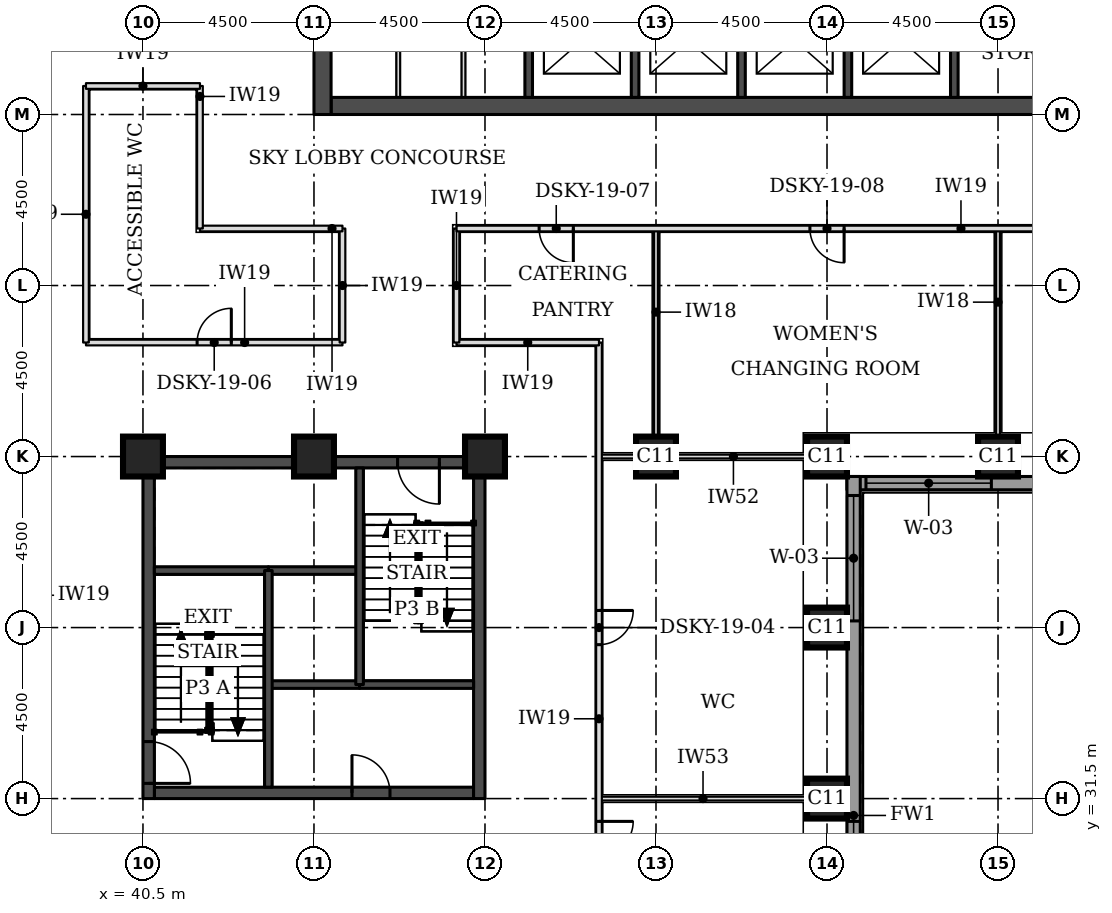
"""IFC4 building model, lengths in metres.
Left out: names, types, materials, properties, quantities, classifications, styles, units other than length and angle.
Written with IfcOpenShell. Run it as: python <this file> out.ifc"""

import sys

from ifc_helpers import new_model, si_unit, direction, frame, frame_2d, origin, origin_2d, place, context, subcontext, project, spatial, rectangle, extrude, element, fill, save


model = new_model("IFC4")
c1 = context("Model", 3, precision=1e-05, world=origin(), true_north=direction((0.0, 1.0)))
c2 = subcontext(c1, "Body", "Model", "MODEL_VIEW")
j1 = project(units=[si_unit("LENGTHUNIT", "METRE"), si_unit("PLANEANGLEUNIT", "RADIAN")], contexts=[c1])
p1 = place(None, origin())
s1 = spatial("IfcSite", under=j1, at=p1, CompositionType="ELEMENT")
p2 = place(p1, origin())
s2 = spatial("IfcBuilding", under=s1, at=p2, CompositionType="ELEMENT")
p3 = place(p2, frame((0.0, 0.0, 74.3)))
s3 = spatial("IfcBuildingStorey", under=s2, at=p3, CompositionType="ELEMENT", Elevation=74.3)
for number, where, z_axis, x_axis in (
    (1, (58.5, 31.5, 0.0), (0.0, 0.0, 1.0), (1.0, 0.0, 0.0)),
    (2, (58.5, 36.0, 0.0), (0.0, 0.0, 1.0), (1.0, 0.0, 0.0)),
    (3, (40.5, 40.5, 0.0), (0.0, 0.0, 1.0), (1.0, 0.0, 0.0)),
    (4, (45.0, 40.5, 0.0), (0.0, 0.0, 1.0), (1.0, 0.0, 0.0)),
    (5, (49.5, 40.5, 0.0), (0.0, 0.0, 1.0), (1.0, 0.0, 0.0)),
    (6, (54.0, 40.5, 0.0), (0.0, 0.0, 1.0), (1.0, 0.0, 0.0)),
    (7, (58.5, 40.5, 0.0), (0.0, 0.0, 1.0), (1.0, 0.0, 0.0)),
    (8, (63.0, 40.5, 0.0), (0.0, 0.0, 1.0), (1.0, 0.0, 0.0)),
):
    element("IfcColumn", number, at=place(p3, frame(where, z_axis=z_axis, x_axis=x_axis)), inside=s3, PredefinedType="COLUMN", context=c2, shape_type="SweptSolid", body=[
        extrude(rectangle(XDim=1.05, YDim=1.05, at=origin_2d()), origin(), (0.0, 0.0, 1.0), 4.6),
    ])
p4 = place(p3, frame((45.45, 49.725, 0.0), z_axis=(0.0, 0.0, 1.0), x_axis=(1.0, 0.0, 0.0)))
e9 = element("IfcWall", 9, at=p4, inside=s3, PredefinedType="SHEAR", context=c2, shape_type="SweptSolid", body=[
    extrude(rectangle(XDim=21.6, YDim=0.45, at=frame_2d((10.8, 0.0))), origin(), (0.0, 0.0, 1.0), 4.6),
])
p5 = place(p3, frame((45.225, 49.5, 0.0), z_axis=(0.0, 0.0, 1.0), x_axis=(0.0, 1.0, 0.0)))
e10 = element("IfcWall", 10, at=p5, inside=s3, PredefinedType="SHEAR", context=c2, shape_type="SweptSolid", body=[
    extrude(rectangle(XDim=22.5, YDim=0.45, at=frame_2d((11.25, 0.0))), origin(), (0.0, 0.0, 1.0), 4.6),
])
p6 = place(p5, frame((4.2, 0.0, 0.0)))
e11 = element("IfcOpeningElement", 11, at=p6, cuts=e10, PredefinedType="OPENING", context=c2, shape_type="SweptSolid", body=[
    extrude(rectangle(XDim=1.8, YDim=2.1, at=frame_2d((0.9, 1.05))), frame((0.0, 0.235, 0.0), z_axis=(0.0, -1.0, 0.0), x_axis=(1.0, 0.0, 0.0)), (0.0, 0.0, 1.0), 0.47),
])
p7 = place(p5, frame((6.9, 0.0, 0.0)))
e12 = element("IfcOpeningElement", 12, at=p7, cuts=e10, PredefinedType="OPENING", context=c2, shape_type="SweptSolid", body=[
    extrude(rectangle(XDim=1.1, YDim=2.1, at=frame_2d((0.55, 1.05))), frame((0.0, 0.235, 0.0), z_axis=(0.0, -1.0, 0.0), x_axis=(1.0, 0.0, 0.0)), (0.0, 0.0, 1.0), 0.47),
])
p8 = place(p5, frame((13.6, 0.0, 0.0)))
e13 = element("IfcOpeningElement", 13, at=p8, cuts=e10, PredefinedType="OPENING", context=c2, shape_type="SweptSolid", body=[
    extrude(rectangle(XDim=1.1, YDim=2.1, at=frame_2d((0.55, 1.05))), frame((0.0, 0.235, 0.0), z_axis=(0.0, -1.0, 0.0), x_axis=(1.0, 0.0, 0.0)), (0.0, 0.0, 1.0), 0.47),
])
p9 = place(p5, frame((16.5, 0.0, 0.0)))
e14 = element("IfcOpeningElement", 14, at=p9, cuts=e10, PredefinedType="OPENING", context=c2, shape_type="SweptSolid", body=[
    extrude(rectangle(XDim=1.8, YDim=2.1, at=frame_2d((0.9, 1.05))), frame((0.0, 0.235, 0.0), z_axis=(0.0, -1.0, 0.0), x_axis=(1.0, 0.0, 0.0)), (0.0, 0.0, 1.0), 0.47),
])
p10 = place(p3, frame((40.8, 31.65, 0.0), z_axis=(0.0, 0.0, 1.0), x_axis=(1.0, 0.0, 0.0)))
e15 = element("IfcWall", 15, at=p10, inside=s3, PredefinedType="SHEAR", context=c2, shape_type="SweptSolid", body=[
    extrude(rectangle(XDim=8.4, YDim=0.3, at=frame_2d((4.2, 0.0))), origin(), (0.0, 0.0, 1.0), 4.6),
])
p11 = place(p10, frame((5.2, 0.0, 0.0)))
e16 = element("IfcOpeningElement", 16, at=p11, cuts=e15, PredefinedType="OPENING", context=c2, shape_type="SweptSolid", body=[
    extrude(rectangle(XDim=1.0, YDim=2.1, at=frame_2d((0.5, 1.05))), frame((0.0, 0.16, 0.0), z_axis=(0.0, -1.0, 0.0), x_axis=(1.0, 0.0, 0.0)), (0.0, 0.0, 1.0), 0.32),
])
p12 = place(p3, frame((40.8, 40.35, 0.0), z_axis=(0.0, 0.0, 1.0), x_axis=(1.0, 0.0, 0.0)))
e17 = element("IfcWall", 17, at=p12, inside=s3, PredefinedType="SHEAR", context=c2, shape_type="SweptSolid", body=[
    extrude(rectangle(XDim=8.4, YDim=0.3, at=frame_2d((4.2, 0.0))), origin(), (0.0, 0.0, 1.0), 4.6),
])
p13 = place(p12, frame((6.4, 0.0, 0.0)))
e18 = element("IfcOpeningElement", 18, at=p13, cuts=e17, PredefinedType="OPENING", context=c2, shape_type="SweptSolid", body=[
    extrude(rectangle(XDim=1.1, YDim=2.1, at=frame_2d((0.55, 1.05))), frame((0.0, 0.16, 0.0), z_axis=(0.0, -1.0, 0.0), x_axis=(1.0, 0.0, 0.0)), (0.0, 0.0, 1.0), 0.32),
])
p14 = place(p3, frame((40.65, 31.5, 0.0), z_axis=(0.0, 0.0, 1.0), x_axis=(0.0, 1.0, 0.0)))
e19 = element("IfcWall", 19, at=p14, inside=s3, PredefinedType="SHEAR", context=c2, shape_type="SweptSolid", body=[
    extrude(rectangle(XDim=9.0, YDim=0.3, at=frame_2d((4.5, 0.0))), origin(), (0.0, 0.0, 1.0), 4.6),
])
p15 = place(p14, frame((0.4, 0.0, 0.0)))
e20 = element("IfcOpeningElement", 20, at=p15, cuts=e19, PredefinedType="OPENING", context=c2, shape_type="SweptSolid", body=[
    extrude(rectangle(XDim=1.1, YDim=2.1, at=frame_2d((0.55, 1.05))), frame((0.0, 0.16, 0.0), z_axis=(0.0, -1.0, 0.0), x_axis=(1.0, 0.0, 0.0)), (0.0, 0.0, 1.0), 0.32),
])
p16 = place(p3, frame((49.35, 31.5, 0.0), z_axis=(0.0, 0.0, 1.0), x_axis=(0.0, 1.0, 0.0)))
e21 = element("IfcWall", 21, at=p16, inside=s3, PredefinedType="SHEAR", context=c2, shape_type="SweptSolid", body=[
    extrude(rectangle(XDim=9.0, YDim=0.3, at=frame_2d((4.5, 0.0))), origin(), (0.0, 0.0, 1.0), 4.6),
])
p17 = place(p3, frame((59.025, 39.8, 0.0), z_axis=(0.0, 0.0, 1.0), x_axis=(1.0, 0.0, 0.0)))
e22 = element("IfcWall", 22, at=p17, inside=s3, PredefinedType="STANDARD", context=c2, shape_type="SweptSolid", body=[
    extrude(rectangle(XDim=13.337, YDim=0.35, at=frame_2d((6.669, 0.0))), origin(), (0.0, 0.0, 1.0), 4.425),
])
p18 = place(p17, frame((0.5, 0.0, 0.9)))
e23 = element("IfcOpeningElement", 23, at=p18, cuts=e22, PredefinedType="OPENING", context=c2, shape_type="SweptSolid", body=[
    extrude(rectangle(XDim=3.3, YDim=2.7, at=frame_2d((1.65, 1.35))), frame((0.0, 0.185, 0.0), z_axis=(0.0, -1.0, 0.0), x_axis=(1.0, 0.0, 0.0)), (0.0, 0.0, 1.0), 0.37),
])
p19 = place(p3, frame((59.2, 22.138, 0.0), z_axis=(0.0, 0.0, 1.0), x_axis=(0.0, 1.0, 0.0)))
e24 = element("IfcWall", 24, at=p19, inside=s3, PredefinedType="STANDARD", context=c2, shape_type="SweptSolid", body=[
    extrude(rectangle(XDim=17.837, YDim=0.35, at=frame_2d((8.919, 0.0))), origin(), (0.0, 0.0, 1.0), 4.425),
])
p20 = place(p19, frame((5.462, 0.0, 0.9)))
e25 = element("IfcOpeningElement", 25, at=p20, cuts=e24, PredefinedType="OPENING", context=c2, shape_type="SweptSolid", body=[
    extrude(rectangle(XDim=3.3, YDim=2.7, at=frame_2d((1.65, 1.35))), frame((0.0, 0.185, 0.0), z_axis=(0.0, -1.0, 0.0), x_axis=(1.0, 0.0, 0.0)), (0.0, 0.0, 1.0), 0.37),
])
p21 = place(p19, frame((14.037, 0.0, 0.9)))
e26 = element("IfcOpeningElement", 26, at=p21, cuts=e24, PredefinedType="OPENING", context=c2, shape_type="SweptSolid", body=[
    extrude(rectangle(XDim=3.3, YDim=2.7, at=frame_2d((1.65, 1.35))), frame((0.0, 0.185, 0.0), z_axis=(0.0, -1.0, 0.0), x_axis=(1.0, 0.0, 0.0)), (0.0, 0.0, 1.0), 0.37),
])
p22 = place(p3, frame((52.5, 31.5, 0.0), z_axis=(0.0, 0.0, 1.0), x_axis=(1.0, 0.0, 0.0)))
e27 = element("IfcWall", 27, at=p22, inside=s3, PredefinedType="PARTITIONING", context=c2, shape_type="SweptSolid", body=[
    extrude(rectangle(XDim=5.475, YDim=0.1, at=frame_2d((2.738, 0.0))), origin(), (0.0, 0.0, 1.0), 3.45),
])
p23 = place(p3, frame((52.5, 40.5, 0.0), z_axis=(0.0, 0.0, 1.0), x_axis=(1.0, 0.0, 0.0)))
e28 = element("IfcWall", 28, at=p23, inside=s3, PredefinedType="PARTITIONING", context=c2, shape_type="SweptSolid", body=[
    extrude(rectangle(XDim=5.475, YDim=0.1, at=frame_2d((2.738, 0.0))), origin(), (0.0, 0.0, 1.0), 3.7),
])
p24 = place(p3, frame((54.0, 40.5, 0.0), z_axis=(0.0, 0.0, 1.0), x_axis=(0.0, 1.0, 0.0)))
e29 = element("IfcWall", 29, at=p24, inside=s3, PredefinedType="PARTITIONING", context=c2, shape_type="SweptSolid", body=[
    extrude(rectangle(XDim=6.0, YDim=0.1, at=frame_2d((3.0, 0.0))), origin(), (0.0, 0.0, 1.0), 4.45),
])
p25 = place(p3, frame((63.0, 41.025, 0.0), z_axis=(0.0, 0.0, 1.0), x_axis=(0.0, 1.0, 0.0)))
e30 = element("IfcWall", 30, at=p25, inside=s3, PredefinedType="PARTITIONING", context=c2, shape_type="SweptSolid", body=[
    extrude(rectangle(XDim=5.475, YDim=0.1, at=frame_2d((2.738, 0.0))), origin(), (0.0, 0.0, 1.0), 4.45),
])
p26 = place(p3, frame((52.5, 28.5, 0.0), z_axis=(0.0, 0.0, 1.0), x_axis=(0.0, 1.0, 0.0)))
e31 = element("IfcWall", 31, at=p26, inside=s3, PredefinedType="PARTITIONING", context=c2, shape_type="SweptSolid", body=[
    extrude(rectangle(XDim=15.0, YDim=0.15, at=frame_2d((7.5, 0.0))), origin(), (0.0, 0.0, 1.0), 4.45),
])
p27 = place(p26, frame((0.6, 0.0, 0.0)))
e32 = element("IfcOpeningElement", 32, at=p27, cuts=e31, PredefinedType="OPENING", context=c2, shape_type="SweptSolid", body=[
    extrude(rectangle(XDim=1.8, YDim=2.4, at=frame_2d((0.9, 1.2))), frame((0.0, 0.085, 0.0), z_axis=(0.0, -1.0, 0.0), x_axis=(1.0, 0.0, 0.0)), (0.0, 0.0, 1.0), 0.17),
])
p28 = place(p26, frame((7.05, 0.0, 0.0)))
e33 = element("IfcOpeningElement", 33, at=p28, cuts=e31, PredefinedType="OPENING", context=c2, shape_type="SweptSolid", body=[
    extrude(rectangle(XDim=0.9, YDim=2.1, at=frame_2d((0.45, 1.05))), frame((0.0, 0.085, 0.0), z_axis=(0.0, -1.0, 0.0), x_axis=(1.0, 0.0, 0.0)), (0.0, 0.0, 1.0), 0.17),
])
p29 = place(p3, frame((39.0, 43.5, 0.0), z_axis=(0.0, 0.0, 1.0), x_axis=(1.0, 0.0, 0.0)))
e34 = element("IfcWall", 34, at=p29, inside=s3, PredefinedType="PARTITIONING", context=c2, shape_type="SweptSolid", body=[
    extrude(rectangle(XDim=6.75, YDim=0.15, at=frame_2d((3.375, 0.0))), origin(), (0.0, 0.0, 1.0), 4.45),
])
p30 = place(p29, frame((2.925, 0.0, 0.0)))
e35 = element("IfcOpeningElement", 35, at=p30, cuts=e34, PredefinedType="OPENING", context=c2, shape_type="SweptSolid", body=[
    extrude(rectangle(XDim=0.9, YDim=2.1, at=frame_2d((0.45, 1.05))), frame((0.0, 0.085, 0.0), z_axis=(0.0, -1.0, 0.0), x_axis=(1.0, 0.0, 0.0)), (0.0, 0.0, 1.0), 0.17),
])
p31 = place(p3, frame((39.0, 43.5, 0.0), z_axis=(0.0, 0.0, 1.0), x_axis=(0.0, 1.0, 0.0)))
e36 = element("IfcWall", 36, at=p31, inside=s3, PredefinedType="PARTITIONING", context=c2, shape_type="SweptSolid", body=[
    extrude(rectangle(XDim=6.75, YDim=0.15, at=frame_2d((3.375, 0.0))), origin(), (0.0, 0.0, 1.0), 4.45),
])
p32 = place(p3, frame((45.75, 43.5, 0.0), z_axis=(0.0, 0.0, 1.0), x_axis=(0.0, 1.0, 0.0)))
e37 = element("IfcWall", 37, at=p32, inside=s3, PredefinedType="PARTITIONING", context=c2, shape_type="SweptSolid", body=[
    extrude(rectangle(XDim=3.0, YDim=0.15, at=frame_2d((1.5, 0.0))), origin(), (0.0, 0.0, 1.0), 4.45),
])
p33 = place(p3, frame((48.75, 43.5, 0.0), z_axis=(0.0, 0.0, 1.0), x_axis=(1.0, 0.0, 0.0)))
e38 = element("IfcWall", 38, at=p33, inside=s3, PredefinedType="PARTITIONING", context=c2, shape_type="SweptSolid", body=[
    extrude(rectangle(XDim=3.75, YDim=0.15, at=frame_2d((1.875, 0.0))), origin(), (0.0, 0.0, 1.0), 4.45),
])
p34 = place(p3, frame((48.75, 43.5, 0.0), z_axis=(0.0, 0.0, 1.0), x_axis=(0.0, 1.0, 0.0)))
e39 = element("IfcWall", 39, at=p34, inside=s3, PredefinedType="PARTITIONING", context=c2, shape_type="SweptSolid", body=[
    extrude(rectangle(XDim=3.0, YDim=0.15, at=frame_2d((1.5, 0.0))), origin(), (0.0, 0.0, 1.0), 4.45),
])
for number, where, z_axis, x_axis in (
    (40, (42.0, 46.5, 0.0), (0.0, 0.0, 1.0), (1.0, 0.0, 0.0)),
    (41, (42.0, 46.5, 0.0), (0.0, 0.0, 1.0), (0.0, 1.0, 0.0)),
):
    element("IfcWall", number, at=place(p3, frame(where, z_axis=z_axis, x_axis=x_axis)), inside=s3, PredefinedType="PARTITIONING", context=c2, shape_type="SweptSolid", body=[
        extrude(rectangle(XDim=3.75, YDim=0.15, at=frame_2d((1.875, 0.0))), origin(), (0.0, 0.0, 1.0), 4.45),
    ])
p35 = place(p3, frame((48.75, 46.5, 0.0), z_axis=(0.0, 0.0, 1.0), x_axis=(1.0, 0.0, 0.0)))
e42 = element("IfcWall", 42, at=p35, inside=s3, PredefinedType="PARTITIONING", context=c2, shape_type="SweptSolid", body=[
    extrude(rectangle(XDim=21.75, YDim=0.15, at=frame_2d((10.875, 0.0))), origin(), (0.0, 0.0, 1.0), 4.45),
])
p36 = place(p35, frame((9.3, 0.0, 0.0)))
e43 = element("IfcOpeningElement", 43, at=p36, cuts=e42, PredefinedType="OPENING", context=c2, shape_type="SweptSolid", body=[
    extrude(rectangle(XDim=0.9, YDim=2.1, at=frame_2d((0.45, 1.05))), frame((0.0, 0.085, 0.0), z_axis=(0.0, -1.0, 0.0), x_axis=(1.0, 0.0, 0.0)), (0.0, 0.0, 1.0), 0.17),
])
p37 = place(p35, frame((2.175, 0.0, 0.0)))
e44 = element("IfcOpeningElement", 44, at=p37, cuts=e42, PredefinedType="OPENING", context=c2, shape_type="SweptSolid", body=[
    extrude(rectangle(XDim=0.9, YDim=2.1, at=frame_2d((0.45, 1.05))), frame((0.0, 0.085, 0.0), z_axis=(0.0, -1.0, 0.0), x_axis=(1.0, 0.0, 0.0)), (0.0, 0.0, 1.0), 0.17),
])
p38 = place(p35, frame((17.55, 0.0, 0.0)))
e45 = element("IfcOpeningElement", 45, at=p38, cuts=e42, PredefinedType="OPENING", context=c2, shape_type="SweptSolid", body=[
    extrude(rectangle(XDim=0.9, YDim=2.1, at=frame_2d((0.45, 1.05))), frame((0.0, 0.085, 0.0), z_axis=(0.0, -1.0, 0.0), x_axis=(1.0, 0.0, 0.0)), (0.0, 0.0, 1.0), 0.17),
])
p39 = place(p3, frame((39.0, 50.25, 0.0), z_axis=(0.0, 0.0, 1.0), x_axis=(1.0, 0.0, 0.0)))
e46 = element("IfcWall", 46, at=p39, inside=s3, PredefinedType="PARTITIONING", context=c2, shape_type="SweptSolid", body=[
    extrude(rectangle(XDim=3.0, YDim=0.15, at=frame_2d((1.5, 0.0))), origin(), (0.0, 0.0, 1.0), 4.45),
])
for number, where, z_axis, x_axis in (
    (47, (47.218, 49.95, 0.0), (0.0, 0.0, 1.0), (0.0, 1.0, 0.0)),
    (48, (48.934, 49.95, 0.0), (0.0, 0.0, 1.0), (0.0, 1.0, 0.0)),
):
    element("IfcWall", number, at=place(p3, frame(where, z_axis=z_axis, x_axis=x_axis)), inside=s3, PredefinedType="PARTITIONING", context=c2, shape_type="SweptSolid", body=[
        extrude(rectangle(XDim=3.05, YDim=0.1, at=frame_2d((1.525, 0.0))), origin(), (0.0, 0.0, 1.0), 4.45),
    ])
for number, where, z_axis, x_axis in (
    (49, (50.65, 49.95, 0.0), (0.0, 0.0, 1.0), (0.0, 1.0, 0.0)),
    (50, (53.45, 49.95, 0.0), (0.0, 0.0, 1.0), (0.0, 1.0, 0.0)),
    (51, (56.25, 49.95, 0.0), (0.0, 0.0, 1.0), (0.0, 1.0, 0.0)),
    (52, (59.05, 49.95, 0.0), (0.0, 0.0, 1.0), (0.0, 1.0, 0.0)),
    (53, (61.85, 49.95, 0.0), (0.0, 0.0, 1.0), (0.0, 1.0, 0.0)),
):
    element("IfcWall", number, at=place(p3, frame(where, z_axis=z_axis, x_axis=x_axis)), inside=s3, PredefinedType="SOLIDWALL", context=c2, shape_type="SweptSolid", body=[
        extrude(rectangle(XDim=3.05, YDim=0.2, at=frame_2d((1.525, 0.0))), origin(), (0.0, 0.0, 1.0), 4.45),
    ])
p40 = place(p3, frame((43.8, 34.5, 0.0), z_axis=(0.0, 0.0, 1.0), x_axis=(1.0, 0.0, 0.0)))
e54 = element("IfcWall", 54, at=p40, inside=s3, PredefinedType="SOLIDWALL", context=c2, shape_type="SweptSolid", body=[
    extrude(rectangle(XDim=2.4, YDim=0.2, at=frame_2d((1.2, 0.0))), origin(), (0.0, 0.0, 1.0), 4.45),
])
p41 = place(p3, frame((46.2, 34.5, 0.0), z_axis=(0.0, 0.0, 1.0), x_axis=(1.0, 0.0, 0.0)))
e55 = element("IfcWall", 55, at=p41, inside=s3, PredefinedType="SOLIDWALL", context=c2, shape_type="SweptSolid", body=[
    extrude(rectangle(XDim=3.0, YDim=0.2, at=frame_2d((1.5, 0.0))), origin(), (0.0, 0.0, 1.0), 4.45),
])
p42 = place(p3, frame((43.8, 37.5, 0.0), z_axis=(0.0, 0.0, 1.0), x_axis=(1.0, 0.0, 0.0)))
e56 = element("IfcWall", 56, at=p42, inside=s3, PredefinedType="SOLIDWALL", context=c2, shape_type="SweptSolid", body=[
    extrude(rectangle(XDim=2.4, YDim=0.2, at=frame_2d((1.2, 0.0))), origin(), (0.0, 0.0, 1.0), 4.6),
])
p43 = place(p3, frame((40.8, 37.5, 0.0), z_axis=(0.0, 0.0, 1.0), x_axis=(1.0, 0.0, 0.0)))
e57 = element("IfcWall", 57, at=p43, inside=s3, PredefinedType="SOLIDWALL", context=c2, shape_type="SweptSolid", body=[
    extrude(rectangle(XDim=3.0, YDim=0.2, at=frame_2d((1.5, 0.0))), origin(), (0.0, 0.0, 1.0), 4.45),
])
for number, where, z_axis, x_axis in (
    (58, (43.8, 31.8, 0.0), (0.0, 0.0, 1.0), (0.0, 1.0, 0.0)),
    (59, (46.2, 34.5, 0.0), (0.0, 0.0, 1.0), (0.0, 1.0, 0.0)),
):
    element("IfcWall", number, at=place(p3, frame(where, z_axis=z_axis, x_axis=x_axis)), inside=s3, PredefinedType="SOLIDWALL", context=c2, shape_type="SweptSolid", body=[
        extrude(rectangle(XDim=5.7, YDim=0.2, at=frame_2d((2.85, 0.0))), origin(), (0.0, 0.0, 1.0), 4.45),
    ])
p44 = place(p18, origin())
e60 = element("IfcWindow", 60, at=p44, inside=s3, PartitioningType="SINGLE_PANEL", PredefinedType="WINDOW", context=c2, shape_type="SweptSolid", body=[
    extrude(rectangle(XDim=3.3, YDim=2.7, at=frame_2d((1.65, 1.35))), frame((0.0, 0.085, 0.0), z_axis=(0.0, -1.0, 0.0), x_axis=(1.0, 0.0, 0.0)), (0.0, 0.0, 1.0), 0.06),
])
fill(e23, e60)
p45 = place(p20, origin())
e61 = element("IfcWindow", 61, at=p45, inside=s3, PartitioningType="SINGLE_PANEL", PredefinedType="WINDOW", context=c2, shape_type="SweptSolid", body=[
    extrude(rectangle(XDim=3.3, YDim=2.7, at=frame_2d((1.65, 1.35))), frame((0.0, 0.085, 0.0), z_axis=(0.0, -1.0, 0.0), x_axis=(1.0, 0.0, 0.0)), (0.0, 0.0, 1.0), 0.06),
])
fill(e25, e61)
p46 = place(p21, origin())
e62 = element("IfcWindow", 62, at=p46, inside=s3, PartitioningType="SINGLE_PANEL", PredefinedType="WINDOW", context=c2, shape_type="SweptSolid", body=[
    extrude(rectangle(XDim=3.3, YDim=2.7, at=frame_2d((1.65, 1.35))), frame((0.0, 0.085, 0.0), z_axis=(0.0, -1.0, 0.0), x_axis=(1.0, 0.0, 0.0)), (0.0, 0.0, 1.0), 0.06),
])
fill(e26, e62)
p47 = place(p27, frame((1.8, 0.0, 0.0), z_axis=(0.0, 0.0, 1.0), x_axis=(-1.0, 0.0, 0.0)))
e63 = element("IfcDoor", 63, at=p47, inside=s3, OperationType="DOUBLE_DOOR_SINGLE_SWING", PredefinedType="DOOR", context=c2, shape_type="SweptSolid", body=[
    extrude(rectangle(XDim=1.8, YDim=2.4, at=frame_2d((0.9, 1.2))), frame((0.0, 0.025, 0.0), z_axis=(0.0, -1.0, 0.0), x_axis=(1.0, 0.0, 0.0)), (0.0, 0.0, 1.0), 0.05),
])
fill(e32, e63)
p48 = place(p28, frame((0.9, 0.0, 0.0), z_axis=(0.0, 0.0, 1.0), x_axis=(-1.0, 0.0, 0.0)))
e64 = element("IfcDoor", 64, at=p48, inside=s3, OperationType="SINGLE_SWING_LEFT", PredefinedType="DOOR", context=c2, shape_type="SweptSolid", body=[
    extrude(rectangle(XDim=0.9, YDim=2.1, at=frame_2d((0.45, 1.05))), frame((0.0, 0.025, 0.0), z_axis=(0.0, -1.0, 0.0), x_axis=(1.0, 0.0, 0.0)), (0.0, 0.0, 1.0), 0.05),
])
fill(e33, e64)
p49 = place(p36, frame((0.9, 0.0, 0.0), z_axis=(0.0, 0.0, 1.0), x_axis=(-1.0, 0.0, 0.0)))
e65 = element("IfcDoor", 65, at=p49, inside=s3, OperationType="SINGLE_SWING_LEFT", PredefinedType="DOOR", context=c2, shape_type="SweptSolid", body=[
    extrude(rectangle(XDim=0.9, YDim=2.1, at=frame_2d((0.45, 1.05))), frame((0.0, 0.025, 0.0), z_axis=(0.0, -1.0, 0.0), x_axis=(1.0, 0.0, 0.0)), (0.0, 0.0, 1.0), 0.05),
])
fill(e43, e65)
p50 = place(p37, frame((0.9, 0.0, 0.0), z_axis=(0.0, 0.0, 1.0), x_axis=(-1.0, 0.0, 0.0)))
e66 = element("IfcDoor", 66, at=p50, inside=s3, OperationType="SINGLE_SWING_LEFT", PredefinedType="DOOR", context=c2, shape_type="SweptSolid", body=[
    extrude(rectangle(XDim=0.9, YDim=2.1, at=frame_2d((0.45, 1.05))), frame((0.0, 0.025, 0.0), z_axis=(0.0, -1.0, 0.0), x_axis=(1.0, 0.0, 0.0)), (0.0, 0.0, 1.0), 0.05),
])
fill(e44, e66)
p51 = place(p30, origin())
e67 = element("IfcDoor", 67, at=p51, inside=s3, OperationType="SINGLE_SWING_RIGHT", PredefinedType="DOOR", context=c2, shape_type="SweptSolid", body=[
    extrude(rectangle(XDim=0.9, YDim=2.1, at=frame_2d((0.45, 1.05))), frame((0.0, 0.025, 0.0), z_axis=(0.0, -1.0, 0.0), x_axis=(1.0, 0.0, 0.0)), (0.0, 0.0, 1.0), 0.05),
])
fill(e35, e67)
p52 = place(p15, frame((1.1, 0.0, 0.0), z_axis=(0.0, 0.0, 1.0), x_axis=(-1.0, 0.0, 0.0)))
e68 = element("IfcDoor", 68, at=p52, inside=s3, OperationType="SINGLE_SWING_RIGHT", PredefinedType="DOOR", context=c2, shape_type="SweptSolid", body=[
    extrude(rectangle(XDim=1.1, YDim=2.1, at=frame_2d((0.55, 1.05))), frame((0.0, 0.025, 0.0), z_axis=(0.0, -1.0, 0.0), x_axis=(1.0, 0.0, 0.0)), (0.0, 0.0, 1.0), 0.05),
])
fill(e20, e68)
p53 = place(p13, frame((1.1, 0.0, 0.0), z_axis=(0.0, 0.0, 1.0), x_axis=(-1.0, 0.0, 0.0)))
e69 = element("IfcDoor", 69, at=p53, inside=s3, OperationType="SINGLE_SWING_LEFT", PredefinedType="DOOR", context=c2, shape_type="SweptSolid", body=[
    extrude(rectangle(XDim=1.1, YDim=2.1, at=frame_2d((0.55, 1.05))), frame((0.0, 0.025, 0.0), z_axis=(0.0, -1.0, 0.0), x_axis=(1.0, 0.0, 0.0)), (0.0, 0.0, 1.0), 0.05),
])
fill(e18, e69)
p54 = place(p11, origin())
e70 = element("IfcDoor", 70, at=p54, inside=s3, OperationType="SINGLE_SWING_LEFT", PredefinedType="DOOR", context=c2, shape_type="SweptSolid", body=[
    extrude(rectangle(XDim=1.0, YDim=2.1, at=frame_2d((0.5, 1.05))), frame((0.0, 0.025, 0.0), z_axis=(0.0, -1.0, 0.0), x_axis=(1.0, 0.0, 0.0)), (0.0, 0.0, 1.0), 0.05),
])
fill(e16, e70)
save(model, sys.argv[1])
